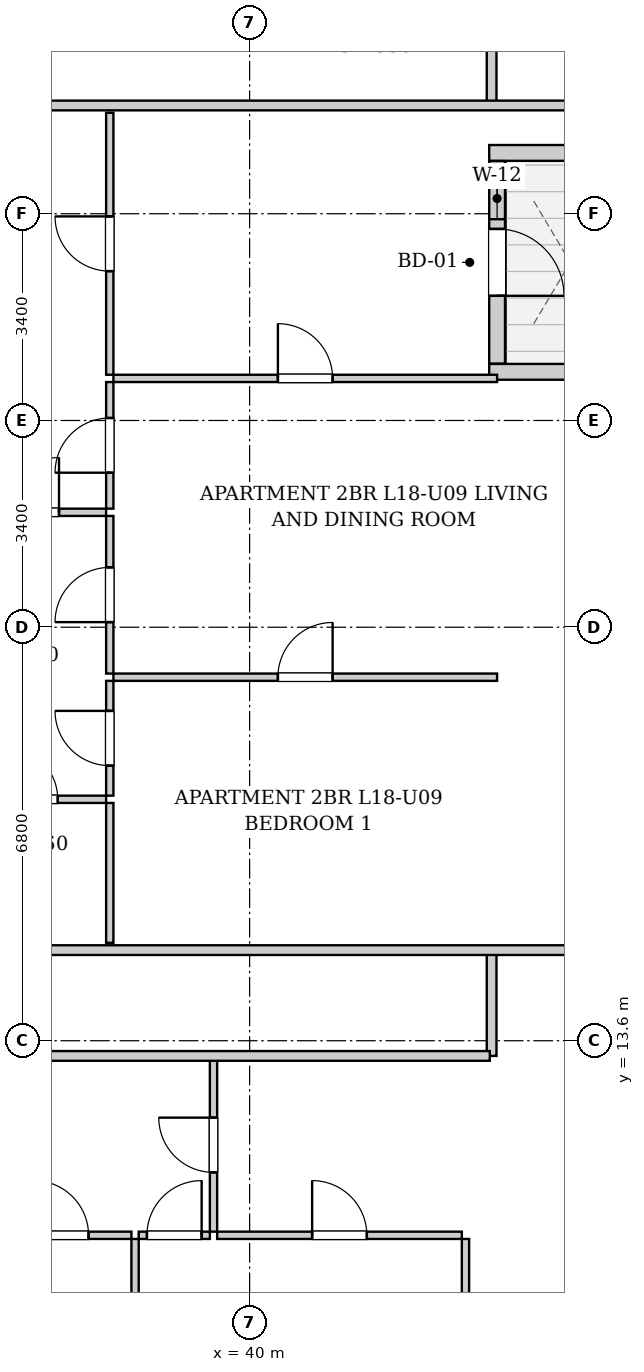
"""IFC4 building model, lengths in metres.
Left out: names, types, materials, properties, quantities, classifications, styles, units other than length and angle.
Written with IfcOpenShell. Run it as: python <this file> out.ifc"""

import sys

from ifc_helpers import new_model, si_unit, direction, frame, frame_2d, origin, place, context, subcontext, project, spatial, rectangle, extrude, element, fill, save


model = new_model("IFC4")
c1 = context("Model", 3, precision=1e-05, world=origin(), true_north=direction((0.0, 1.0)))
c2 = subcontext(c1, "Body", "Model", "MODEL_VIEW")
j1 = project(units=[si_unit("LENGTHUNIT", "METRE"), si_unit("PLANEANGLEUNIT", "RADIAN")], contexts=[c1])
p1 = place(None, origin())
s1 = spatial("IfcSite", under=j1, at=p1, CompositionType="ELEMENT")
p2 = place(p1, origin())
s2 = spatial("IfcBuilding", under=s1, at=p2, CompositionType="ELEMENT")
p3 = place(p2, frame((0.0, 0.0, 67.4)))
s3 = spatial("IfcBuildingStorey", under=s2, at=p3, CompositionType="ELEMENT", Elevation=67.4)
p4 = place(p3, frame((46.34, 28.2, 0.0), z_axis=(0.0, 0.0, 1.0), x_axis=(-1.0, 0.0, 0.0)))
e1 = element("IfcWall", 1, at=p4, inside=s3, PredefinedType="SOLIDWALL", context=c2, shape_type="SweptSolid", body=[
    extrude(rectangle(XDim=2.4, YDim=0.26, at=frame_2d((1.2, 0.0))), origin(), (0.0, 0.0, 1.0), 2.88),
])
p5 = place(p3, frame((44.07, 28.066, 0.0), z_axis=(0.0, 0.0, 1.0), x_axis=(0.0, -1.0, 0.0)))
e2 = element("IfcWall", 2, at=p5, inside=s3, PredefinedType="SOLIDWALL", context=c2, shape_type="SweptSolid", body=[
    extrude(rectangle(XDim=3.332, YDim=0.26, at=frame_2d((1.666, 0.0))), origin(), (0.0, 0.0, 1.0), 2.88),
])
p6 = place(p5, frame((1.116, 0.0, 0.0)))
e3 = element("IfcOpeningElement", 3, at=p6, cuts=e2, PredefinedType="OPENING", context=c2, shape_type="SweptSolid", body=[
    extrude(rectangle(XDim=1.1, YDim=2.0, at=frame_2d((0.55, 1.0))), frame((0.0, 0.14, 0.0), z_axis=(0.0, -1.0, 0.0), x_axis=(1.0, 0.0, 0.0)), (0.0, 0.0, 1.0), 0.28),
])
p7 = place(p5, frame((0.276, 0.0, 0.55)))
e4 = element("IfcOpeningElement", 4, at=p7, cuts=e2, PredefinedType="OPENING", context=c2, shape_type="SweptSolid", body=[
    extrude(rectangle(XDim=0.68, YDim=1.2, at=frame_2d((0.34, 0.6))), frame((0.0, 0.14, 0.0), z_axis=(0.0, -1.0, 0.0), x_axis=(1.0, 0.0, 0.0)), (0.0, 0.0, 1.0), 0.28),
])
p8 = place(p3, frame((43.94, 24.6, 0.0), z_axis=(0.0, 0.0, 1.0), x_axis=(1.0, 0.0, 0.0)))
e5 = element("IfcWall", 5, at=p8, inside=s3, PredefinedType="SOLIDWALL", context=c2, shape_type="SweptSolid", body=[
    extrude(rectangle(XDim=2.4, YDim=0.26, at=frame_2d((1.2, 0.0))), origin(), (0.0, 0.0, 1.0), 2.88),
])
for number, where, z_axis, x_axis in (
    (6, (43.98, 13.35, 0.0), (0.0, 0.0, 1.0), (0.0, 1.0, 0.0)),
    (7, (43.98, 28.98, 0.0), (0.0, 0.0, 1.0), (0.0, 1.0, 0.0)),
):
    element("IfcWall", number, at=place(p3, frame(where, z_axis=z_axis, x_axis=x_axis)), inside=s3, PredefinedType="PARTITIONING", context=c2, shape_type="SweptSolid", body=[
        extrude(rectangle(XDim=1.74, YDim=0.16, at=frame_2d((0.87, 0.0))), origin(), (0.0, 0.0, 1.0), 2.88),
    ])
for number, where, z_axis, x_axis in (
    (8, (35.11, 15.09, 0.0), (0.0, 0.0, 1.0), (1.0, 0.0, 0.0)),
    (9, (35.11, 28.98, 0.0), (0.0, 0.0, 1.0), (1.0, 0.0, 0.0)),
):
    element("IfcWall", number, at=place(p3, frame(where, z_axis=z_axis, x_axis=x_axis)), inside=s3, PredefinedType="PARTITIONING", context=c2, shape_type="SweptSolid", body=[
        extrude(rectangle(XDim=11.11, YDim=0.16, at=frame_2d((5.555, 0.0))), origin(), (0.0, 0.0, 1.0), 2.172),
    ])
p9 = place(p3, frame((39.406, 10.46, 0.0), z_axis=(0.0, 0.0, 1.0), x_axis=(0.0, 1.0, 0.0)))
e10 = element("IfcWall", 10, at=p9, inside=s3, PredefinedType="PARTITIONING", context=c2, shape_type="SweptSolid", body=[
    extrude(rectangle(XDim=2.85, YDim=0.12, at=frame_2d((1.425, 0.0))), origin(), (0.0, 0.0, 1.0), 2.88),
])
p10 = place(p9, frame((0.975, 0.0, 0.0)))
e11 = element("IfcOpeningElement", 11, at=p10, cuts=e10, PredefinedType="OPENING", context=c2, shape_type="SweptSolid", body=[
    extrude(rectangle(XDim=0.9, YDim=2.05, at=frame_2d((0.45, 1.025))), frame((0.0, 0.07, 0.0), z_axis=(0.0, -1.0, 0.0), x_axis=(1.0, 0.0, 0.0)), (0.0, 0.0, 1.0), 0.14),
])
p11 = place(p3, frame((35.746, 10.4, 0.0), z_axis=(0.0, 0.0, 1.0), x_axis=(1.0, 0.0, 0.0)))
e12 = element("IfcWall", 12, at=p11, inside=s3, PredefinedType="PARTITIONING", context=c2, shape_type="SweptSolid", body=[
    extrude(rectangle(XDim=2.31, YDim=0.12, at=frame_2d((1.155, 0.0))), origin(), (0.0, 0.0, 1.0), 2.88),
])
p12 = place(p11, frame((0.705, 0.0, 0.0)))
e13 = element("IfcOpeningElement", 13, at=p12, cuts=e12, PredefinedType="OPENING", context=c2, shape_type="SweptSolid", body=[
    extrude(rectangle(XDim=0.9, YDim=2.05, at=frame_2d((0.45, 1.025))), frame((0.0, 0.07, 0.0), z_axis=(0.0, -1.0, 0.0), x_axis=(1.0, 0.0, 0.0)), (0.0, 0.0, 1.0), 0.14),
])
p13 = place(p3, frame((38.176, 10.4, 0.0), z_axis=(0.0, 0.0, 1.0), x_axis=(1.0, 0.0, 0.0)))
e14 = element("IfcWall", 14, at=p13, inside=s3, PredefinedType="PARTITIONING", context=c2, shape_type="SweptSolid", body=[
    extrude(rectangle(XDim=1.17, YDim=0.12, at=frame_2d((0.585, 0.0))), origin(), (0.0, 0.0, 1.0), 2.88),
])
p14 = place(p13, frame((0.135, 0.0, 0.0)))
e15 = element("IfcOpeningElement", 15, at=p14, cuts=e14, PredefinedType="OPENING", context=c2, shape_type="SweptSolid", body=[
    extrude(rectangle(XDim=0.9, YDim=2.05, at=frame_2d((0.45, 1.025))), frame((0.0, 0.07, 0.0), z_axis=(0.0, -1.0, 0.0), x_axis=(1.0, 0.0, 0.0)), (0.0, 0.0, 1.0), 0.14),
])
p15 = place(p3, frame((39.466, 10.4, 0.0), z_axis=(0.0, 0.0, 1.0), x_axis=(1.0, 0.0, 0.0)))
e16 = element("IfcWall", 16, at=p15, inside=s3, PredefinedType="PARTITIONING", context=c2, shape_type="SweptSolid", body=[
    extrude(rectangle(XDim=4.024, YDim=0.12, at=frame_2d((2.012, 0.0))), origin(), (0.0, 0.0, 1.0), 2.88),
])
p16 = place(p15, frame((1.562, 0.0, 0.0)))
e17 = element("IfcOpeningElement", 17, at=p16, cuts=e16, PredefinedType="OPENING", context=c2, shape_type="SweptSolid", body=[
    extrude(rectangle(XDim=0.9, YDim=2.05, at=frame_2d((0.45, 1.025))), frame((0.0, 0.07, 0.0), z_axis=(0.0, -1.0, 0.0), x_axis=(1.0, 0.0, 0.0)), (0.0, 0.0, 1.0), 0.14),
])
p17 = place(p3, frame((38.116, 0.28, 0.0), z_axis=(0.0, 0.0, 1.0), x_axis=(0.0, 1.0, 0.0)))
e18 = element("IfcWall", 18, at=p17, inside=s3, PredefinedType="PARTITIONING", context=c2, shape_type="SweptSolid", body=[
    extrude(rectangle(XDim=10.06, YDim=0.12, at=frame_2d((5.03, 0.0))), origin(), (0.0, 0.0, 1.0), 2.88),
])
p18 = place(p17, frame((4.565, 0.0, 0.0)))
e19 = element("IfcOpeningElement", 19, at=p18, cuts=e18, PredefinedType="OPENING", context=c2, shape_type="SweptSolid", body=[
    extrude(rectangle(XDim=0.9, YDim=2.05, at=frame_2d((0.45, 1.025))), frame((0.0, 0.07, 0.0), z_axis=(0.0, -1.0, 0.0), x_axis=(1.0, 0.0, 0.0)), (0.0, 0.0, 1.0), 0.14),
])
p19 = place(p3, frame((43.55, 0.28, 0.0), z_axis=(0.0, 0.0, 1.0), x_axis=(0.0, 1.0, 0.0)))
e20 = element("IfcWall", 20, at=p19, inside=s3, PredefinedType="PARTITIONING", context=c2, shape_type="SweptSolid", body=[
    extrude(rectangle(XDim=10.06, YDim=0.12, at=frame_2d((5.03, 0.0))), origin(), (0.0, 0.0, 1.0), 2.88),
])
p20 = place(p19, frame((4.565, 0.0, 0.0)))
e21 = element("IfcOpeningElement", 21, at=p20, cuts=e20, PredefinedType="OPENING", context=c2, shape_type="SweptSolid", body=[
    extrude(rectangle(XDim=0.9, YDim=2.05, at=frame_2d((0.45, 1.025))), frame((0.0, 0.07, 0.0), z_axis=(0.0, -1.0, 0.0), x_axis=(1.0, 0.0, 0.0)), (0.0, 0.0, 1.0), 0.14),
])
p21 = place(p3, frame((35.19, 22.29, 0.0), z_axis=(0.0, 0.0, 1.0), x_axis=(1.0, 0.0, 0.0)))
e22 = element("IfcWall", 22, at=p21, inside=s3, PredefinedType="PARTITIONING", context=c2, shape_type="SweptSolid", body=[
    extrude(rectangle(XDim=2.45, YDim=0.12, at=frame_2d((1.225, 0.0))), origin(), (0.0, 0.0, 1.0), 2.88),
])
p22 = place(p21, frame((0.775, 0.0, 0.0)))
e23 = element("IfcOpeningElement", 23, at=p22, cuts=e22, PredefinedType="OPENING", context=c2, shape_type="SweptSolid", body=[
    extrude(rectangle(XDim=0.9, YDim=2.05, at=frame_2d((0.45, 1.025))), frame((0.0, 0.07, 0.0), z_axis=(0.0, -1.0, 0.0), x_axis=(1.0, 0.0, 0.0)), (0.0, 0.0, 1.0), 0.14),
])
p23 = place(p3, frame((37.7, 22.35, 0.0), z_axis=(0.0, 0.0, 1.0), x_axis=(0.0, 1.0, 0.0)))
e24 = element("IfcWall", 24, at=p23, inside=s3, PredefinedType="PARTITIONING", context=c2, shape_type="SweptSolid", body=[
    extrude(rectangle(XDim=2.082, YDim=0.12, at=frame_2d((1.041, 0.0))), origin(), (0.0, 0.0, 1.0), 2.88),
])
p24 = place(p23, frame((0.591, 0.0, 0.0)))
e25 = element("IfcOpeningElement", 25, at=p24, cuts=e24, PredefinedType="OPENING", context=c2, shape_type="SweptSolid", body=[
    extrude(rectangle(XDim=0.9, YDim=2.05, at=frame_2d((0.45, 1.025))), frame((0.0, 0.07, 0.0), z_axis=(0.0, -1.0, 0.0), x_axis=(1.0, 0.0, 0.0)), (0.0, 0.0, 1.0), 0.14),
])
p25 = place(p3, frame((37.7, 24.552, 0.0), z_axis=(0.0, 0.0, 1.0), x_axis=(0.0, 1.0, 0.0)))
e26 = element("IfcWall", 26, at=p25, inside=s3, PredefinedType="PARTITIONING", context=c2, shape_type="SweptSolid", body=[
    extrude(rectangle(XDim=4.308, YDim=0.12, at=frame_2d((2.154, 0.0))), origin(), (0.0, 0.0, 1.0), 2.88),
])
p26 = place(p25, frame((1.704, 0.0, 0.0)))
e27 = element("IfcOpeningElement", 27, at=p26, cuts=e26, PredefinedType="OPENING", context=c2, shape_type="SweptSolid", body=[
    extrude(rectangle(XDim=0.9, YDim=2.05, at=frame_2d((0.45, 1.025))), frame((0.0, 0.07, 0.0), z_axis=(0.0, -1.0, 0.0), x_axis=(1.0, 0.0, 0.0)), (0.0, 0.0, 1.0), 0.14),
])
p27 = place(p3, frame((35.19, 17.57, 0.0), z_axis=(0.0, 0.0, 1.0), x_axis=(1.0, 0.0, 0.0)))
e28 = element("IfcWall", 28, at=p27, inside=s3, PredefinedType="PARTITIONING", context=c2, shape_type="SweptSolid", body=[
    extrude(rectangle(XDim=2.45, YDim=0.12, at=frame_2d((1.225, 0.0))), origin(), (0.0, 0.0, 1.0), 2.88),
])
p28 = place(p27, frame((0.795, 0.0, 0.0)))
e29 = element("IfcOpeningElement", 29, at=p28, cuts=e28, PredefinedType="OPENING", context=c2, shape_type="SweptSolid", body=[
    extrude(rectangle(XDim=0.86, YDim=2.05, at=frame_2d((0.43, 1.025))), frame((0.0, 0.07, 0.0), z_axis=(0.0, -1.0, 0.0), x_axis=(1.0, 0.0, 0.0)), (0.0, 0.0, 1.0), 0.14),
])
p29 = place(p3, frame((37.7, 15.21, 0.0), z_axis=(0.0, 0.0, 1.0), x_axis=(0.0, 1.0, 0.0)))
e30 = element("IfcWall", 30, at=p29, inside=s3, PredefinedType="PARTITIONING", context=c2, shape_type="SweptSolid", body=[
    extrude(rectangle(XDim=2.3, YDim=0.12, at=frame_2d((1.15, 0.0))), origin(), (0.0, 0.0, 1.0), 2.88),
])
p30 = place(p3, frame((37.7, 17.63, 0.0), z_axis=(0.0, 0.0, 1.0), x_axis=(0.0, 1.0, 0.0)))
e31 = element("IfcWall", 31, at=p30, inside=s3, PredefinedType="PARTITIONING", context=c2, shape_type="SweptSolid", body=[
    extrude(rectangle(XDim=1.888, YDim=0.12, at=frame_2d((0.944, 0.0))), origin(), (0.0, 0.0, 1.0), 2.88),
])
p31 = place(p30, frame((0.494, 0.0, 0.0)))
e32 = element("IfcOpeningElement", 32, at=p31, cuts=e31, PredefinedType="OPENING", context=c2, shape_type="SweptSolid", body=[
    extrude(rectangle(XDim=0.9, YDim=2.05, at=frame_2d((0.45, 1.025))), frame((0.0, 0.07, 0.0), z_axis=(0.0, -1.0, 0.0), x_axis=(1.0, 0.0, 0.0)), (0.0, 0.0, 1.0), 0.14),
])
p32 = place(p3, frame((37.7, 19.638, 0.0), z_axis=(0.0, 0.0, 1.0), x_axis=(0.0, 1.0, 0.0)))
e33 = element("IfcWall", 33, at=p32, inside=s3, PredefinedType="PARTITIONING", context=c2, shape_type="SweptSolid", body=[
    extrude(rectangle(XDim=2.592, YDim=0.12, at=frame_2d((1.296, 0.0))), origin(), (0.0, 0.0, 1.0), 2.88),
])
p33 = place(p32, frame((0.846, 0.0, 0.0)))
e34 = element("IfcOpeningElement", 34, at=p33, cuts=e33, PredefinedType="OPENING", context=c2, shape_type="SweptSolid", body=[
    extrude(rectangle(XDim=0.9, YDim=2.05, at=frame_2d((0.45, 1.025))), frame((0.0, 0.07, 0.0), z_axis=(0.0, -1.0, 0.0), x_axis=(1.0, 0.0, 0.0)), (0.0, 0.0, 1.0), 0.14),
])
p34 = place(p3, frame((37.76, 19.578, 0.0), z_axis=(0.0, 0.0, 1.0), x_axis=(1.0, 0.0, 0.0)))
e35 = element("IfcWall", 35, at=p34, inside=s3, PredefinedType="PARTITIONING", context=c2, shape_type="SweptSolid", body=[
    extrude(rectangle(XDim=6.31, YDim=0.12, at=frame_2d((3.155, 0.0))), origin(), (0.0, 0.0, 1.0), 2.88),
])
p35 = place(p34, frame((2.705, 0.0, 0.0)))
e36 = element("IfcOpeningElement", 36, at=p35, cuts=e35, PredefinedType="OPENING", context=c2, shape_type="SweptSolid", body=[
    extrude(rectangle(XDim=0.9, YDim=2.05, at=frame_2d((0.45, 1.025))), frame((0.0, 0.07, 0.0), z_axis=(0.0, -1.0, 0.0), x_axis=(1.0, 0.0, 0.0)), (0.0, 0.0, 1.0), 0.14),
])
p36 = place(p3, frame((37.76, 24.492, 0.0), z_axis=(0.0, 0.0, 1.0), x_axis=(1.0, 0.0, 0.0)))
e37 = element("IfcWall", 37, at=p36, inside=s3, PredefinedType="PARTITIONING", context=c2, shape_type="SweptSolid", body=[
    extrude(rectangle(XDim=6.31, YDim=0.12, at=frame_2d((3.155, 0.0))), origin(), (0.0, 0.0, 1.0), 2.448),
])
p37 = place(p36, frame((2.705, 0.0, 0.0)))
e38 = element("IfcOpeningElement", 38, at=p37, cuts=e37, PredefinedType="OPENING", context=c2, shape_type="SweptSolid", body=[
    extrude(rectangle(XDim=0.9, YDim=2.05, at=frame_2d((0.45, 1.025))), frame((0.0, 0.07, 0.0), z_axis=(0.0, -1.0, 0.0), x_axis=(1.0, 0.0, 0.0)), (0.0, 0.0, 1.0), 0.14),
])
p38 = place(p3, frame((10.05, 13.35, 0.0), z_axis=(0.0, 0.0, 1.0), x_axis=(1.0, 0.0, 0.0)))
e39 = element("IfcWall", 39, at=p38, inside=s3, PredefinedType="PARTITIONING", context=c2, shape_type="SweptSolid", body=[
    extrude(rectangle(XDim=33.9, YDim=0.16, at=frame_2d((16.95, 0.0))), origin(), (0.0, 0.0, 1.0), 2.88),
])
p39 = place(p38, frame((3.8, 0.0, 0.0)))
e40 = element("IfcOpeningElement", 40, at=p39, cuts=e39, PredefinedType="OPENING", context=c2, shape_type="SweptSolid", body=[
    extrude(rectangle(XDim=0.95, YDim=2.1, at=frame_2d((0.475, 1.05))), frame((0.0, 0.09, 0.0), z_axis=(0.0, -1.0, 0.0), x_axis=(1.0, 0.0, 0.0)), (0.0, 0.0, 1.0), 0.18),
])
p40 = place(p38, frame((13.071, 0.0, 0.0)))
e41 = element("IfcOpeningElement", 41, at=p40, cuts=e39, PredefinedType="OPENING", context=c2, shape_type="SweptSolid", body=[
    extrude(rectangle(XDim=0.95, YDim=2.1, at=frame_2d((0.475, 1.05))), frame((0.0, 0.09, 0.0), z_axis=(0.0, -1.0, 0.0), x_axis=(1.0, 0.0, 0.0)), (0.0, 0.0, 1.0), 0.18),
])
p41 = place(p10, origin())
e42 = element("IfcDoor", 42, at=p41, inside=s3, OperationType="SINGLE_SWING_RIGHT", PredefinedType="DOOR", context=c2, shape_type="SweptSolid", body=[
    extrude(rectangle(XDim=0.9, YDim=2.05, at=frame_2d((0.45, 1.025))), frame((0.0, 0.025, 0.0), z_axis=(0.0, -1.0, 0.0), x_axis=(1.0, 0.0, 0.0)), (0.0, 0.0, 1.0), 0.05),
])
fill(e11, e42)
p42 = place(p12, origin())
e43 = element("IfcDoor", 43, at=p42, inside=s3, OperationType="SINGLE_SWING_LEFT", PredefinedType="DOOR", context=c2, shape_type="SweptSolid", body=[
    extrude(rectangle(XDim=0.9, YDim=2.05, at=frame_2d((0.45, 1.025))), frame((0.0, 0.025, 0.0), z_axis=(0.0, -1.0, 0.0), x_axis=(1.0, 0.0, 0.0)), (0.0, 0.0, 1.0), 0.05),
])
fill(e13, e43)
p43 = place(p14, origin())
e44 = element("IfcDoor", 44, at=p43, inside=s3, OperationType="SINGLE_SWING_RIGHT", PredefinedType="DOOR", context=c2, shape_type="SweptSolid", body=[
    extrude(rectangle(XDim=0.9, YDim=2.05, at=frame_2d((0.45, 1.025))), frame((0.0, 0.025, 0.0), z_axis=(0.0, -1.0, 0.0), x_axis=(1.0, 0.0, 0.0)), (0.0, 0.0, 1.0), 0.05),
])
fill(e15, e44)
p44 = place(p16, origin())
e45 = element("IfcDoor", 45, at=p44, inside=s3, OperationType="SINGLE_SWING_LEFT", PredefinedType="DOOR", context=c2, shape_type="SweptSolid", body=[
    extrude(rectangle(XDim=0.9, YDim=2.05, at=frame_2d((0.45, 1.025))), frame((0.0, 0.025, 0.0), z_axis=(0.0, -1.0, 0.0), x_axis=(1.0, 0.0, 0.0)), (0.0, 0.0, 1.0), 0.05),
])
fill(e17, e45)
p45 = place(p22, origin())
e46 = element("IfcDoor", 46, at=p45, inside=s3, OperationType="SINGLE_SWING_RIGHT", PredefinedType="DOOR", context=c2, shape_type="SweptSolid", body=[
    extrude(rectangle(XDim=0.9, YDim=2.05, at=frame_2d((0.45, 1.025))), frame((0.0, 0.025, 0.0), z_axis=(0.0, -1.0, 0.0), x_axis=(1.0, 0.0, 0.0)), (0.0, 0.0, 1.0), 0.05),
])
fill(e23, e46)
p46 = place(p24, origin())
e47 = element("IfcDoor", 47, at=p46, inside=s3, OperationType="SINGLE_SWING_LEFT", PredefinedType="DOOR", context=c2, shape_type="SweptSolid", body=[
    extrude(rectangle(XDim=0.9, YDim=2.05, at=frame_2d((0.45, 1.025))), frame((0.0, 0.025, 0.0), z_axis=(0.0, -1.0, 0.0), x_axis=(1.0, 0.0, 0.0)), (0.0, 0.0, 1.0), 0.05),
])
fill(e25, e47)
p47 = place(p26, origin())
e48 = element("IfcDoor", 48, at=p47, inside=s3, OperationType="SINGLE_SWING_RIGHT", PredefinedType="DOOR", context=c2, shape_type="SweptSolid", body=[
    extrude(rectangle(XDim=0.9, YDim=2.05, at=frame_2d((0.45, 1.025))), frame((0.0, 0.025, 0.0), z_axis=(0.0, -1.0, 0.0), x_axis=(1.0, 0.0, 0.0)), (0.0, 0.0, 1.0), 0.05),
])
fill(e27, e48)
p48 = place(p28, origin())
e49 = element("IfcDoor", 49, at=p48, inside=s3, OperationType="SINGLE_SWING_LEFT", PredefinedType="DOOR", context=c2, shape_type="SweptSolid", body=[
    extrude(rectangle(XDim=0.86, YDim=2.05, at=frame_2d((0.43, 1.025))), frame((0.0, 0.025, 0.0), z_axis=(0.0, -1.0, 0.0), x_axis=(1.0, 0.0, 0.0)), (0.0, 0.0, 1.0), 0.05),
])
fill(e29, e49)
p49 = place(p31, origin())
e50 = element("IfcDoor", 50, at=p49, inside=s3, OperationType="SINGLE_SWING_RIGHT", PredefinedType="DOOR", context=c2, shape_type="SweptSolid", body=[
    extrude(rectangle(XDim=0.9, YDim=2.05, at=frame_2d((0.45, 1.025))), frame((0.0, 0.025, 0.0), z_axis=(0.0, -1.0, 0.0), x_axis=(1.0, 0.0, 0.0)), (0.0, 0.0, 1.0), 0.05),
])
fill(e32, e50)
p50 = place(p33, origin())
e51 = element("IfcDoor", 51, at=p50, inside=s3, OperationType="SINGLE_SWING_LEFT", PredefinedType="DOOR", context=c2, shape_type="SweptSolid", body=[
    extrude(rectangle(XDim=0.9, YDim=2.05, at=frame_2d((0.45, 1.025))), frame((0.0, 0.025, 0.0), z_axis=(0.0, -1.0, 0.0), x_axis=(1.0, 0.0, 0.0)), (0.0, 0.0, 1.0), 0.05),
])
fill(e34, e51)
p51 = place(p35, origin())
e52 = element("IfcDoor", 52, at=p51, inside=s3, OperationType="SINGLE_SWING_RIGHT", PredefinedType="DOOR", context=c2, shape_type="SweptSolid", body=[
    extrude(rectangle(XDim=0.9, YDim=2.05, at=frame_2d((0.45, 1.025))), frame((0.0, 0.025, 0.0), z_axis=(0.0, -1.0, 0.0), x_axis=(1.0, 0.0, 0.0)), (0.0, 0.0, 1.0), 0.05),
])
fill(e36, e52)
p52 = place(p37, origin())
e53 = element("IfcDoor", 53, at=p52, inside=s3, OperationType="SINGLE_SWING_LEFT", PredefinedType="DOOR", context=c2, shape_type="SweptSolid", body=[
    extrude(rectangle(XDim=0.9, YDim=2.05, at=frame_2d((0.45, 1.025))), frame((0.0, 0.025, 0.0), z_axis=(0.0, -1.0, 0.0), x_axis=(1.0, 0.0, 0.0)), (0.0, 0.0, 1.0), 0.05),
])
fill(e38, e53)
p53 = place(p6, origin())
e54 = element("IfcDoor", 54, at=p53, inside=s3, OperationType="SINGLE_SWING_RIGHT", PredefinedType="DOOR", context=c2, shape_type="SweptSolid", body=[
    extrude(rectangle(XDim=1.1, YDim=2.0, at=frame_2d((0.55, 1.0))), frame((0.0, 0.025, 0.0), z_axis=(0.0, -1.0, 0.0), x_axis=(1.0, 0.0, 0.0)), (0.0, 0.0, 1.0), 0.05),
])
fill(e3, e54)
p54 = place(p7, origin())
e55 = element("IfcWindow", 55, at=p54, inside=s3, PartitioningType="SINGLE_PANEL", PredefinedType="WINDOW", context=c2, shape_type="SweptSolid", body=[
    extrude(rectangle(XDim=0.68, YDim=1.2, at=frame_2d((0.34, 0.6))), frame((0.0, 0.03, 0.0), z_axis=(0.0, -1.0, 0.0), x_axis=(1.0, 0.0, 0.0)), (0.0, 0.0, 1.0), 0.06),
])
fill(e4, e55)
save(model, sys.argv[1])
